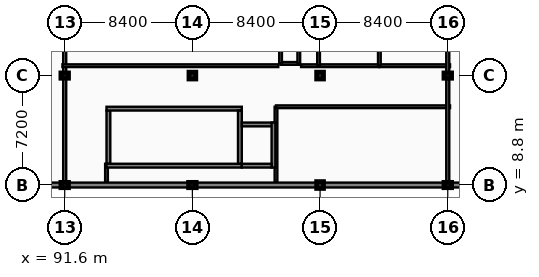
"""IFC4 building model, lengths in metres.
Left out: names, types, materials, properties, quantities, classifications, styles, units other than length and angle.
Written with IfcOpenShell. Run it as: python <this file> out.ifc"""

import sys

from ifc_helpers import new_model, si_unit, direction, frame, frame_2d, origin, origin_2d, place, context, subcontext, project, spatial, rectangle, extrude, element, fill, save


model = new_model("IFC4")
c1 = context("Model", 3, precision=1e-05, world=origin(), true_north=direction((0.0, 1.0)))
c2 = subcontext(c1, "Body", "Model", "MODEL_VIEW")
j1 = project(units=[si_unit("LENGTHUNIT", "METRE"), si_unit("PLANEANGLEUNIT", "RADIAN")], contexts=[c1])
p1 = place(None, origin())
s1 = spatial("IfcSite", under=j1, at=p1, CompositionType="ELEMENT")
p2 = place(p1, origin())
s2 = spatial("IfcBuilding", under=s1, at=p2, CompositionType="ELEMENT")
p3 = place(p2, origin())
s3 = spatial("IfcBuildingStorey", under=s2, at=p3, CompositionType="ELEMENT", Elevation=0.0)
for number, where, z_axis, x_axis in (
    (1, (91.6, 8.8, 0.0), (0.0, 0.0, 1.0), (1.0, 0.0, 0.0)),
    (2, (91.6, 16.0, 0.0), (0.0, 0.0, 1.0), (1.0, 0.0, 0.0)),
    (3, (100.0, 8.8, 0.0), (0.0, 0.0, 1.0), (1.0, 0.0, 0.0)),
):
    element("IfcColumn", number, at=place(p3, frame(where, z_axis=z_axis, x_axis=x_axis)), inside=s3, PredefinedType="PILASTER", context=c2, shape_type="SweptSolid", body=[
        extrude(rectangle(XDim=0.5, YDim=0.35, at=origin_2d()), origin(), (0.0, 0.0, 1.0), 5.4),
    ])
for number, where, z_axis, x_axis in (
    (4, (100.0, 16.0, 0.0), (0.0, 0.0, 1.0), (1.0, 0.0, 0.0)),
    (5, (108.4, 8.8, 0.0), (0.0, 0.0, 1.0), (1.0, 0.0, 0.0)),
    (6, (108.4, 16.0, 0.0), (0.0, 0.0, 1.0), (1.0, 0.0, 0.0)),
):
    element("IfcColumn", number, at=place(p3, frame(where, z_axis=z_axis, x_axis=x_axis)), inside=s3, PredefinedType="COLUMN", context=c2, shape_type="SweptSolid", body=[
        extrude(rectangle(XDim=0.45, YDim=0.45, at=origin_2d()), origin(), (0.0, 0.0, 1.0), 5.4),
    ])
for number, where, z_axis, x_axis in (
    (7, (116.8, 8.8, 0.0), (0.0, 0.0, 1.0), (1.0, 0.0, 0.0)),
    (8, (116.8, 16.0, 0.0), (0.0, 0.0, 1.0), (1.0, 0.0, 0.0)),
):
    element("IfcColumn", number, at=place(p3, frame(where, z_axis=z_axis, x_axis=x_axis)), inside=s3, PredefinedType="PILASTER", context=c2, shape_type="SweptSolid", body=[
        extrude(rectangle(XDim=0.5, YDim=0.35, at=origin_2d()), origin(), (0.0, 0.0, 1.0), 5.4),
    ])
p4 = place(p3, frame((91.6, 8.95, 0.0), z_axis=(0.0, 0.0, 1.0), x_axis=(0.0, 1.0, 0.0)))
e9 = element("IfcWall", 9, at=p4, inside=s3, PredefinedType="PARTITIONING", context=c2, shape_type="SweptSolid", body=[
    extrude(rectangle(XDim=14.1, YDim=0.2, at=frame_2d((7.05, 0.0))), origin(), (0.0, 0.0, 1.0), 3.99),
])
p5 = place(p4, frame((3.936, 0.0, -0.01)))
e10 = element("IfcOpeningElement", 10, at=p5, cuts=e9, PredefinedType="OPENING", context=c2, shape_type="SweptSolid", body=[
    extrude(rectangle(XDim=1.8, YDim=2.26, at=frame_2d((0.9, 1.13))), frame((0.0, 0.11, 0.0), z_axis=(0.0, -1.0, 0.0), x_axis=(1.0, 0.0, 0.0)), (0.0, 0.0, 1.0), 0.22),
])
p6 = place(p3, frame((94.35, 8.96, 0.0), z_axis=(0.0, 0.0, 1.0), x_axis=(0.0, 1.0, 0.0)))
e11 = element("IfcWall", 11, at=p6, inside=s3, PredefinedType="PARTITIONING", context=c2, shape_type="SweptSolid", body=[
    extrude(rectangle(XDim=1.24, YDim=0.18, at=frame_2d((0.62, 0.0))), origin(), (0.0, 0.0, 1.0), 4.64),
])
p7 = place(p3, frame((105.5, 8.95, 0.0), z_axis=(0.0, 0.0, 1.0), x_axis=(0.0, 1.0, 0.0)))
e12 = element("IfcWall", 12, at=p7, inside=s3, PredefinedType="PARTITIONING", context=c2, shape_type="SweptSolid", body=[
    extrude(rectangle(XDim=5.0, YDim=0.18, at=frame_2d((2.5, 0.0))), origin(), (0.0, 0.0, 1.0), 4.64),
])
p8 = place(p3, frame((105.5, 13.95, 0.0), z_axis=(0.0, 0.0, 1.0), x_axis=(1.0, 0.0, 0.0)))
e13 = element("IfcWall", 13, at=p8, inside=s3, PredefinedType="PARTITIONING", context=c2, shape_type="SweptSolid", body=[
    extrude(rectangle(XDim=11.45, YDim=0.18, at=frame_2d((5.725, 0.0))), origin(), (0.0, 0.0, 1.0), 4.64),
])
p9 = place(p8, frame((5.225, 0.0, -0.01)))
e14 = element("IfcOpeningElement", 14, at=p9, cuts=e13, PredefinedType="OPENING", context=c2, shape_type="SweptSolid", body=[
    extrude(rectangle(XDim=1.0, YDim=2.16, at=frame_2d((0.5, 1.08))), frame((0.0, 0.1, 0.0), z_axis=(0.0, -1.0, 0.0), x_axis=(1.0, 0.0, 0.0)), (0.0, 0.0, 1.0), 0.2),
])
p10 = place(p3, frame((91.45, 16.65, 0.0), z_axis=(0.0, 0.0, 1.0), x_axis=(1.0, 0.0, 0.0)))
e15 = element("IfcWall", 15, at=p10, inside=s3, PredefinedType="PARTITIONING", context=c2, shape_type="SweptSolid", body=[
    extrude(rectangle(XDim=14.2, YDim=0.18, at=frame_2d((7.1, 0.0))), origin(), (0.0, 0.0, 1.0), 4.64),
])
p11 = place(p10, frame((5.67, 0.0, -0.01)))
e16 = element("IfcOpeningElement", 16, at=p11, cuts=e15, PredefinedType="OPENING", context=c2, shape_type="SweptSolid", body=[
    extrude(rectangle(XDim=1.6, YDim=2.21, at=frame_2d((0.8, 1.105))), frame((0.0, 0.1, 0.0), z_axis=(0.0, -1.0, 0.0), x_axis=(1.0, 0.0, 0.0)), (0.0, 0.0, 1.0), 0.2),
])
p12 = place(p3, frame((107.15, 16.65, 0.0), z_axis=(0.0, 0.0, 1.0), x_axis=(1.0, 0.0, 0.0)))
e17 = element("IfcWall", 17, at=p12, inside=s3, PredefinedType="PARTITIONING", context=c2, shape_type="SweptSolid", body=[
    extrude(rectangle(XDim=5.15, YDim=0.18, at=frame_2d((2.575, 0.0))), origin(), (0.0, 0.0, 1.0), 4.64),
])
p13 = place(p12, frame((2.697, 0.0, -0.01)))
e18 = element("IfcOpeningElement", 18, at=p13, cuts=e17, PredefinedType="OPENING", context=c2, shape_type="SweptSolid", body=[
    extrude(rectangle(XDim=1.0, YDim=2.16, at=frame_2d((0.5, 1.08))), frame((0.0, 0.1, 0.0), z_axis=(0.0, -1.0, 0.0), x_axis=(1.0, 0.0, 0.0)), (0.0, 0.0, 1.0), 0.2),
])
p14 = place(p3, frame((112.3, 16.65, 0.0), z_axis=(0.0, 0.0, 1.0), x_axis=(1.0, 0.0, 0.0)))
e19 = element("IfcWall", 19, at=p14, inside=s3, PredefinedType="PARTITIONING", context=c2, shape_type="SweptSolid", body=[
    extrude(rectangle(XDim=4.65, YDim=0.18, at=frame_2d((2.325, 0.0))), origin(), (0.0, 0.0, 1.0), 4.64),
])
p15 = place(p14, frame((1.825, 0.0, -0.01)))
e20 = element("IfcOpeningElement", 20, at=p15, cuts=e19, PredefinedType="OPENING", context=c2, shape_type="SweptSolid", body=[
    extrude(rectangle(XDim=1.0, YDim=2.16, at=frame_2d((0.5, 1.08))), frame((0.0, 0.1, 0.0), z_axis=(0.0, -1.0, 0.0), x_axis=(1.0, 0.0, 0.0)), (0.0, 0.0, 1.0), 0.2),
])
for number, where, z_axis, x_axis in (
    (21, (108.3, 16.65, 0.0), (0.0, 0.0, 1.0), (0.0, 1.0, 0.0)),
    (22, (112.3, 16.65, 0.0), (0.0, 0.0, 1.0), (0.0, 1.0, 0.0)),
):
    element("IfcWall", number, at=place(p3, frame(where, z_axis=z_axis, x_axis=x_axis)), inside=s3, PredefinedType="PARTITIONING", context=c2, shape_type="SweptSolid", body=[
        extrude(rectangle(XDim=6.4, YDim=0.18, at=frame_2d((3.2, 0.0))), origin(), (0.0, 0.0, 1.0), 4.64),
    ])
p16 = place(p3, frame((116.8, 8.95, 0.0), z_axis=(0.0, 0.0, 1.0), x_axis=(0.0, 1.0, 0.0)))
e23 = element("IfcWall", 23, at=p16, inside=s3, PredefinedType="PARTITIONING", context=c2, shape_type="SweptSolid", body=[
    extrude(rectangle(XDim=14.1, YDim=0.2, at=frame_2d((7.05, 0.0))), origin(), (0.0, 0.0, 1.0), 3.99),
])
p17 = place(p16, frame((8.364, 0.0, -0.01)))
e24 = element("IfcOpeningElement", 24, at=p17, cuts=e23, PredefinedType="OPENING", context=c2, shape_type="SweptSolid", body=[
    extrude(rectangle(XDim=1.8, YDim=2.26, at=frame_2d((0.9, 1.13))), frame((0.0, 0.11, 0.0), z_axis=(0.0, -1.0, 0.0), x_axis=(1.0, 0.0, 0.0)), (0.0, 0.0, 1.0), 0.22),
])
p18 = place(p3, frame((91.6, 8.8, 0.0), z_axis=(0.0, 0.0, 1.0), x_axis=(1.0, 0.0, 0.0)))
e25 = element("IfcWall", 25, at=p18, inside=s3, PredefinedType="SOLIDWALL", context=c2, shape_type="SweptSolid", body=[
    extrude(rectangle(XDim=8.4, YDim=0.32, at=frame_2d((4.2, 0.0))), origin(), (0.0, 0.0, 1.0), 3.99),
])
p19 = place(p18, frame((4.26, 0.0, 0.9)))
e26 = element("IfcOpeningElement", 26, at=p19, cuts=e25, PredefinedType="OPENING", context=c2, shape_type="SweptSolid", body=[
    extrude(rectangle(XDim=2.4, YDim=2.35, at=frame_2d((1.2, 1.175))), frame((0.0, 0.17, 0.0), z_axis=(0.0, -1.0, 0.0), x_axis=(1.0, 0.0, 0.0)), (0.0, 0.0, 1.0), 0.34),
])
p20 = place(p3, frame((100.0, 8.8, 0.0), z_axis=(0.0, 0.0, 1.0), x_axis=(1.0, 0.0, 0.0)))
e27 = element("IfcWall", 27, at=p20, inside=s3, PredefinedType="SOLIDWALL", context=c2, shape_type="SweptSolid", body=[
    extrude(rectangle(XDim=8.4, YDim=0.32, at=frame_2d((4.2, 0.0))), origin(), (0.0, 0.0, 1.0), 4.64),
])
p21 = place(p20, frame((3.2, 0.0, -0.01)))
e28 = element("IfcOpeningElement", 28, at=p21, cuts=e27, PredefinedType="OPENING", context=c2, shape_type="SweptSolid", body=[
    extrude(rectangle(XDim=2.0, YDim=2.41, at=frame_2d((1.0, 1.205))), frame((0.0, 0.17, 0.0), z_axis=(0.0, -1.0, 0.0), x_axis=(1.0, 0.0, 0.0)), (0.0, 0.0, 1.0), 0.34),
])
p22 = place(p3, frame((108.4, 8.8, 0.0), z_axis=(0.0, 0.0, 1.0), x_axis=(1.0, 0.0, 0.0)))
e29 = element("IfcWall", 29, at=p22, inside=s3, PredefinedType="SOLIDWALL", context=c2, shape_type="SweptSolid", body=[
    extrude(rectangle(XDim=8.4, YDim=0.32, at=frame_2d((4.2, 0.0))), origin(), (0.0, 0.0, 1.0), 3.99),
])
p23 = place(p22, frame((0.46, 0.0, 0.9)))
e30 = element("IfcOpeningElement", 30, at=p23, cuts=e29, PredefinedType="OPENING", context=c2, shape_type="SweptSolid", body=[
    extrude(rectangle(XDim=2.4, YDim=2.35, at=frame_2d((1.2, 1.175))), frame((0.0, 0.17, 0.0), z_axis=(0.0, -1.0, 0.0), x_axis=(1.0, 0.0, 0.0)), (0.0, 0.0, 1.0), 0.34),
])
p24 = place(p22, frame((5.46, 0.0, 0.9)))
e31 = element("IfcOpeningElement", 31, at=p24, cuts=e29, PredefinedType="OPENING", context=c2, shape_type="SweptSolid", body=[
    extrude(rectangle(XDim=2.4, YDim=2.35, at=frame_2d((1.2, 1.175))), frame((0.0, 0.17, 0.0), z_axis=(0.0, -1.0, 0.0), x_axis=(1.0, 0.0, 0.0)), (0.0, 0.0, 1.0), 0.34),
])
p25 = place(p3, frame((86.8, 8.8, 0.0), z_axis=(0.0, 0.0, 1.0), x_axis=(1.0, 0.0, 0.0)))
e32 = element("IfcWall", 32, at=p25, inside=s3, PredefinedType="SOLIDWALL", context=c2, shape_type="SweptSolid", body=[
    extrude(rectangle(XDim=4.8, YDim=0.32, at=frame_2d((2.4, 0.0))), origin(), (0.0, 0.0, 1.0), 3.99),
])
p26 = place(p25, frame((1.46, 0.0, 0.9)))
e33 = element("IfcOpeningElement", 33, at=p26, cuts=e32, PredefinedType="OPENING", context=c2, shape_type="SweptSolid", body=[
    extrude(rectangle(XDim=1.8, YDim=2.2, at=frame_2d((0.9, 1.1))), frame((0.0, 0.17, 0.0), z_axis=(0.0, -1.0, 0.0), x_axis=(1.0, 0.0, 0.0)), (0.0, 0.0, 1.0), 0.34),
])
p27 = place(p3, frame((116.8, 8.8, 0.0), z_axis=(0.0, 0.0, 1.0), x_axis=(1.0, 0.0, 0.0)))
e34 = element("IfcWall", 34, at=p27, inside=s3, PredefinedType="SOLIDWALL", context=c2, shape_type="SweptSolid", body=[
    extrude(rectangle(XDim=4.8, YDim=0.32, at=frame_2d((2.4, 0.0))), origin(), (0.0, 0.0, 1.0), 3.99),
])
p28 = place(p27, frame((1.46, 0.0, 0.9)))
e35 = element("IfcOpeningElement", 35, at=p28, cuts=e34, PredefinedType="OPENING", context=c2, shape_type="SweptSolid", body=[
    extrude(rectangle(XDim=1.8, YDim=2.2, at=frame_2d((0.9, 1.1))), frame((0.0, 0.17, 0.0), z_axis=(0.0, -1.0, 0.0), x_axis=(1.0, 0.0, 0.0)), (0.0, 0.0, 1.0), 0.34),
])
p29 = place(p3, frame((94.475, 13.7, 0.0), z_axis=(0.0, 0.0, 1.0), x_axis=(0.0, -1.0, 0.0)))
e36 = element("IfcWall", 36, at=p29, inside=s3, PredefinedType="SHEAR", context=c2, shape_type="SweptSolid", body=[
    extrude(rectangle(XDim=3.5, YDim=0.25, at=frame_2d((1.75, 0.0))), origin(), (0.0, 0.0, 1.0), 5.4),
])
p30 = place(p29, frame((1.1, 0.0, -0.01)))
e37 = element("IfcOpeningElement", 37, at=p30, cuts=e36, PredefinedType="OPENING", context=c2, shape_type="SweptSolid", body=[
    extrude(rectangle(XDim=1.3, YDim=2.16, at=frame_2d((0.65, 1.08))), frame((0.0, 0.135, 0.0), z_axis=(0.0, -1.0, 0.0), x_axis=(1.0, 0.0, 0.0)), (0.0, 0.0, 1.0), 0.27),
])
for number, where, z_axis, x_axis in (
    (38, (94.35, 10.075, 0.0), (0.0, 0.0, 1.0), (1.0, 0.0, 0.0)),
    (39, (94.35, 13.825, 0.0), (0.0, 0.0, 1.0), (1.0, 0.0, 0.0)),
):
    element("IfcWall", number, at=place(p3, frame(where, z_axis=z_axis, x_axis=x_axis)), inside=s3, PredefinedType="SHEAR", context=c2, shape_type="SweptSolid", body=[
        extrude(rectangle(XDim=8.9, YDim=0.25, at=frame_2d((4.45, 0.0))), origin(), (0.0, 0.0, 1.0), 5.4),
    ])
p31 = place(p3, frame((103.125, 10.2, 0.0), z_axis=(0.0, 0.0, 1.0), x_axis=(0.0, 1.0, 0.0)))
e40 = element("IfcWall", 40, at=p31, inside=s3, PredefinedType="SHEAR", context=c2, shape_type="SweptSolid", body=[
    extrude(rectangle(XDim=3.5, YDim=0.25, at=frame_2d((1.75, 0.0))), origin(), (0.0, 0.0, 1.0), 5.4),
])
p32 = place(p3, frame((103.25, 12.785, 0.0), z_axis=(0.0, 0.0, 1.0), x_axis=(1.0, 0.0, 0.0)))
e41 = element("IfcWall", 41, at=p32, inside=s3, PredefinedType="SHEAR", context=c2, shape_type="SweptSolid", body=[
    extrude(rectangle(XDim=2.21, YDim=0.25, at=frame_2d((1.105, 0.0))), origin(), (0.0, 0.0, 1.0), 5.4),
])
p33 = place(p3, frame((105.335, 9.95, 0.0), z_axis=(0.0, 0.0, 1.0), x_axis=(0.0, 1.0, 0.0)))
e42 = element("IfcWall", 42, at=p33, inside=s3, PredefinedType="SHEAR", context=c2, shape_type="SweptSolid", body=[
    extrude(rectangle(XDim=2.96, YDim=0.25, at=frame_2d((1.48, 0.0))), origin(), (0.0, 0.0, 1.0), 5.4),
])
p34 = place(p3, frame((103.25, 10.075, 0.0), z_axis=(0.0, 0.0, 1.0), x_axis=(1.0, 0.0, 0.0)))
e43 = element("IfcWall", 43, at=p34, inside=s3, PredefinedType="SHEAR", context=c2, shape_type="SweptSolid", body=[
    extrude(rectangle(XDim=1.96, YDim=0.25, at=frame_2d((0.98, 0.0))), origin(), (0.0, 0.0, 1.0), 5.4),
])
p35 = place(p34, frame((0.43, 0.0, -0.01)))
e44 = element("IfcOpeningElement", 44, at=p35, cuts=e43, PredefinedType="OPENING", context=c2, shape_type="SweptSolid", body=[
    extrude(rectangle(XDim=1.1, YDim=2.16, at=frame_2d((0.55, 1.08))), frame((0.0, 0.135, 0.0), z_axis=(0.0, -1.0, 0.0), x_axis=(1.0, 0.0, 0.0)), (0.0, 0.0, 1.0), 0.27),
])
p36 = place(p3, frame((105.8, 16.8, 0.0), z_axis=(0.0, 0.0, 1.0), x_axis=(1.0, 0.0, 0.0)))
e45 = element("IfcWall", 45, at=p36, inside=s3, PredefinedType="SOLIDWALL", context=c2, shape_type="SweptSolid", body=[
    extrude(rectangle(XDim=1.2, YDim=0.18, at=frame_2d((0.6, 0.0))), origin(), (0.0, 0.0, 1.0), 5.07),
])
p37 = place(p36, frame((0.2, 0.0, -0.01)))
e46 = element("IfcOpeningElement", 46, at=p37, cuts=e45, PredefinedType="OPENING", context=c2, shape_type="SweptSolid", body=[
    extrude(rectangle(XDim=0.8, YDim=2.06, at=frame_2d((0.4, 1.03))), frame((0.0, 0.1, 0.0), z_axis=(0.0, -1.0, 0.0), x_axis=(1.0, 0.0, 0.0)), (0.0, 0.0, 1.0), 0.2),
])
for number, where, z_axis, x_axis in (
    (47, (107.0, 16.8, 0.0), (0.0, 0.0, 1.0), (0.0, 1.0, 0.0)),
    (48, (105.8, 18.0, 0.0), (0.0, 0.0, 1.0), (0.0, -1.0, 0.0)),
):
    element("IfcWall", number, at=place(p3, frame(where, z_axis=z_axis, x_axis=x_axis)), inside=s3, PredefinedType="SOLIDWALL", context=c2, shape_type="SweptSolid", body=[
        extrude(rectangle(XDim=1.2, YDim=0.18, at=frame_2d((0.6, 0.0))), origin(), (0.0, 0.0, 1.0), 5.07),
    ])
p38 = place(p5, frame((1.8, 0.0, 0.01), z_axis=(0.0, 0.0, 1.0), x_axis=(-1.0, 0.0, 0.0)))
e49 = element("IfcDoor", 49, at=p38, inside=s3, OperationType="DOUBLE_SWING_LEFT", PredefinedType="DOOR", context=c2, shape_type="SweptSolid", body=[
    extrude(rectangle(XDim=1.8, YDim=2.25, at=frame_2d((0.9, 1.125))), frame((0.0, 0.025, 0.0), z_axis=(0.0, -1.0, 0.0), x_axis=(1.0, 0.0, 0.0)), (0.0, 0.0, 1.0), 0.05),
])
fill(e10, e49)
p39 = place(p9, frame((0.0, 0.0, 0.01)))
e50 = element("IfcDoor", 50, at=p39, inside=s3, OperationType="SINGLE_SWING_RIGHT", PredefinedType="DOOR", context=c2, shape_type="SweptSolid", body=[
    extrude(rectangle(XDim=1.0, YDim=2.15, at=frame_2d((0.5, 1.075))), frame((0.0, 0.025, 0.0), z_axis=(0.0, -1.0, 0.0), x_axis=(1.0, 0.0, 0.0)), (0.0, 0.0, 1.0), 0.05),
])
fill(e14, e50)
p40 = place(p11, frame((0.0, 0.0, 0.01)))
e51 = element("IfcDoor", 51, at=p40, inside=s3, OperationType="DOUBLE_SWING_LEFT", PredefinedType="DOOR", context=c2, shape_type="SweptSolid", body=[
    extrude(rectangle(XDim=1.6, YDim=2.2, at=frame_2d((0.8, 1.1))), frame((0.0, 0.025, 0.0), z_axis=(0.0, -1.0, 0.0), x_axis=(1.0, 0.0, 0.0)), (0.0, 0.0, 1.0), 0.05),
])
fill(e16, e51)
p41 = place(p13, frame((1.0, 0.0, 0.01), z_axis=(0.0, 0.0, 1.0), x_axis=(-1.0, 0.0, 0.0)))
e52 = element("IfcDoor", 52, at=p41, inside=s3, OperationType="SINGLE_SWING_RIGHT", PredefinedType="DOOR", context=c2, shape_type="SweptSolid", body=[
    extrude(rectangle(XDim=1.0, YDim=2.15, at=frame_2d((0.5, 1.075))), frame((0.0, 0.025, 0.0), z_axis=(0.0, -1.0, 0.0), x_axis=(1.0, 0.0, 0.0)), (0.0, 0.0, 1.0), 0.05),
])
fill(e18, e52)
p42 = place(p15, frame((0.0, 0.0, 0.01)))
e53 = element("IfcDoor", 53, at=p42, inside=s3, OperationType="SINGLE_SWING_LEFT", PredefinedType="DOOR", context=c2, shape_type="SweptSolid", body=[
    extrude(rectangle(XDim=1.0, YDim=2.15, at=frame_2d((0.5, 1.075))), frame((0.0, 0.025, 0.0), z_axis=(0.0, -1.0, 0.0), x_axis=(1.0, 0.0, 0.0)), (0.0, 0.0, 1.0), 0.05),
])
fill(e20, e53)
p43 = place(p17, frame((0.0, 0.0, 0.01)))
e54 = element("IfcDoor", 54, at=p43, inside=s3, OperationType="DOUBLE_SWING_LEFT", PredefinedType="DOOR", context=c2, shape_type="SweptSolid", body=[
    extrude(rectangle(XDim=1.8, YDim=2.25, at=frame_2d((0.9, 1.125))), frame((0.0, 0.025, 0.0), z_axis=(0.0, -1.0, 0.0), x_axis=(1.0, 0.0, 0.0)), (0.0, 0.0, 1.0), 0.05),
])
fill(e24, e54)
p44 = place(p19, origin())
e55 = element("IfcWindow", 55, at=p44, inside=s3, PartitioningType="TRIPLE_PANEL_VERTICAL", PredefinedType="WINDOW", context=c2, shape_type="SweptSolid", body=[
    extrude(rectangle(XDim=2.4, YDim=2.35, at=frame_2d((1.2, 1.175))), frame((0.0, 0.03, 0.0), z_axis=(0.0, -1.0, 0.0), x_axis=(1.0, 0.0, 0.0)), (0.0, 0.0, 1.0), 0.06),
])
fill(e26, e55)
p45 = place(p21, frame((0.0, 0.0, 0.01)))
e56 = element("IfcDoor", 56, at=p45, inside=s3, OperationType="DOUBLE_SWING_LEFT", PredefinedType="DOOR", context=c2, shape_type="SweptSolid", body=[
    extrude(rectangle(XDim=2.0, YDim=2.4, at=frame_2d((1.0, 1.2))), frame((0.0, 0.025, 0.0), z_axis=(0.0, -1.0, 0.0), x_axis=(1.0, 0.0, 0.0)), (0.0, 0.0, 1.0), 0.05),
])
fill(e28, e56)
p46 = place(p23, origin())
e57 = element("IfcWindow", 57, at=p46, inside=s3, PartitioningType="TRIPLE_PANEL_VERTICAL", PredefinedType="WINDOW", context=c2, shape_type="SweptSolid", body=[
    extrude(rectangle(XDim=2.4, YDim=2.35, at=frame_2d((1.2, 1.175))), frame((0.0, 0.03, 0.0), z_axis=(0.0, -1.0, 0.0), x_axis=(1.0, 0.0, 0.0)), (0.0, 0.0, 1.0), 0.06),
])
fill(e30, e57)
p47 = place(p24, origin())
e58 = element("IfcWindow", 58, at=p47, inside=s3, PartitioningType="TRIPLE_PANEL_VERTICAL", PredefinedType="WINDOW", context=c2, shape_type="SweptSolid", body=[
    extrude(rectangle(XDim=2.4, YDim=2.35, at=frame_2d((1.2, 1.175))), frame((0.0, 0.03, 0.0), z_axis=(0.0, -1.0, 0.0), x_axis=(1.0, 0.0, 0.0)), (0.0, 0.0, 1.0), 0.06),
])
fill(e31, e58)
p48 = place(p30, frame((0.0, 0.0, 0.01)))
e59 = element("IfcDoor", 59, at=p48, inside=s3, OperationType="SINGLE_SWING_RIGHT", PredefinedType="DOOR", context=c2, shape_type="SweptSolid", body=[
    extrude(rectangle(XDim=1.3, YDim=2.15, at=frame_2d((0.65, 1.075))), frame((0.0, 0.025, 0.0), z_axis=(0.0, -1.0, 0.0), x_axis=(1.0, 0.0, 0.0)), (0.0, 0.0, 1.0), 0.05),
])
fill(e37, e59)
p49 = place(p35, frame((0.0, 0.0, 0.01)))
e60 = element("IfcDoor", 60, at=p49, inside=s3, OperationType="SLIDING_TO_LEFT", PredefinedType="DOOR", context=c2, shape_type="SweptSolid", body=[
    extrude(rectangle(XDim=1.1, YDim=2.15, at=frame_2d((0.55, 1.075))), frame((0.0, 0.025, 0.0), z_axis=(0.0, -1.0, 0.0), x_axis=(1.0, 0.0, 0.0)), (0.0, 0.0, 1.0), 0.05),
])
fill(e44, e60)
p50 = place(p37, frame((0.0, 0.0, 0.01)))
e61 = element("IfcDoor", 61, at=p50, inside=s3, OperationType="SINGLE_SWING_LEFT", PredefinedType="DOOR", context=c2, shape_type="SweptSolid", body=[
    extrude(rectangle(XDim=0.8, YDim=2.05, at=frame_2d((0.4, 1.025))), frame((0.0, 0.025, 0.0), z_axis=(0.0, -1.0, 0.0), x_axis=(1.0, 0.0, 0.0)), (0.0, 0.0, 1.0), 0.05),
])
fill(e46, e61)
save(model, sys.argv[1])
